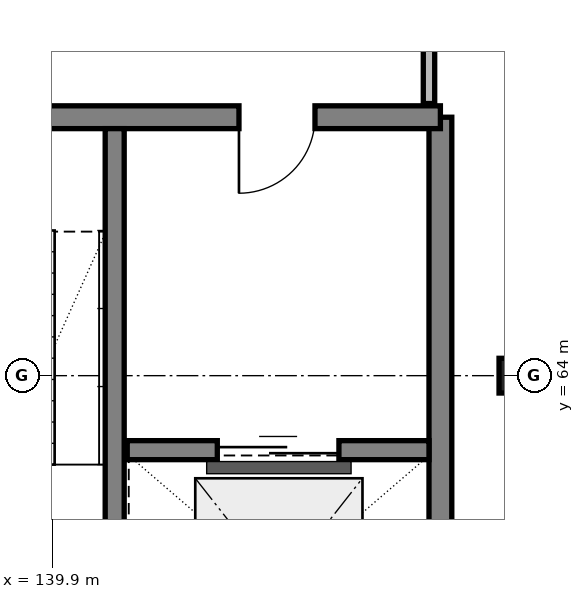
"""IFC4 building model, lengths in metres.
Left out: names, types, materials, properties, quantities, classifications, styles, units other than length and angle.
Written with IfcOpenShell. Run it as: python <this file> out.ifc"""

import sys

from ifc_helpers import new_model, si_unit, direction, frame, frame_2d, origin, origin_2d_with_axis, place, context, subcontext, project, spatial, rectangle, hollow_circle, extrude, element, fill, save


model = new_model("IFC4")
c1 = context("Model", 3, precision=1e-05, world=origin(), true_north=direction((0.0, 1.0)))
c2 = subcontext(c1, "Body", "Model", "MODEL_VIEW")
j1 = project(units=[si_unit("LENGTHUNIT", "METRE"), si_unit("PLANEANGLEUNIT", "RADIAN")], contexts=[c1])
p1 = place(None, origin())
s1 = spatial("IfcSite", under=j1, at=p1, CompositionType="ELEMENT")
p2 = place(p1, origin())
s2 = spatial("IfcBuilding", under=s1, at=p2, CompositionType="ELEMENT")
p3 = place(p2, origin())
s3 = spatial("IfcBuildingStorey", under=s2, at=p3, CompositionType="ELEMENT", Elevation=0.0)
p4 = place(p3, frame((146.0, 64.0, 0.0), z_axis=(0.0, 0.0, 1.0), x_axis=(1.0, 0.0, 0.0)))
e1 = element("IfcColumn", 1, at=p4, inside=s3, PredefinedType="COLUMN", context=c2, shape_type="SweptSolid", body=[
    extrude(hollow_circle(Radius=0.229, WallThickness=0.013, at=origin_2d_with_axis()), origin(), (0.0, 0.0, 1.0), 4.5),
])
p5 = place(p3, frame((145.0, 59.4, 0.0), z_axis=(0.0, 0.0, 1.0), x_axis=(0.0, 1.0, 0.0)))
e2 = element("IfcWall", 2, at=p5, inside=s3, PredefinedType="SHEAR", context=c2, shape_type="SweptSolid", body=[
    extrude(rectangle(XDim=8.0, YDim=0.3, at=frame_2d((4.0, 0.0), x_axis=(1.0, 0.0))), origin(), (0.0, 0.0, 1.0), 4.5),
])
p6 = place(p3, frame((145.0, 67.4, 0.0), z_axis=(0.0, 0.0, 1.0), x_axis=(-1.0, 0.0, 0.0)))
e3 = element("IfcWall", 3, at=p6, inside=s3, PredefinedType="SHEAR", context=c2, shape_type="SweptSolid", body=[
    extrude(rectangle(XDim=7.4, YDim=0.3, at=frame_2d((3.7, 0.0), x_axis=(1.0, 0.0))), origin(), (0.0, 0.0, 1.0), 4.5),
])
p7 = place(p6, frame((1.65, 0.0, 0.0)))
e4 = element("IfcOpeningElement", 4, at=p7, cuts=e3, PredefinedType="OPENING", context=c2, shape_type="SweptSolid", body=[
    extrude(rectangle(XDim=1.0, YDim=2.15, at=frame_2d((0.5, 1.075), x_axis=(1.0, 0.0))), frame((0.0, 0.16, 0.0), z_axis=(0.0, -1.0, 0.0), x_axis=(1.0, 0.0, 0.0)), (0.0, 0.0, 1.0), 0.32),
])
p8 = place(p6, frame((5.3, 0.0, 0.0)))
e5 = element("IfcOpeningElement", 5, at=p8, cuts=e3, PredefinedType="OPENING", context=c2, shape_type="SweptSolid", body=[
    extrude(rectangle(XDim=1.0, YDim=2.15, at=frame_2d((0.5, 1.075), x_axis=(1.0, 0.0))), frame((0.0, 0.16, 0.0), z_axis=(0.0, -1.0, 0.0), x_axis=(1.0, 0.0, 0.0)), (0.0, 0.0, 1.0), 0.32),
])
p9 = place(p3, frame((140.715, 59.55, 0.0), z_axis=(0.0, 0.0, 1.0), x_axis=(0.0, 1.0, 0.0)))
e6 = element("IfcWall", 6, at=p9, inside=s3, PredefinedType="SHEAR", context=c2, shape_type="SweptSolid", body=[
    extrude(rectangle(XDim=7.7, YDim=0.25, at=frame_2d((3.85, 0.0), x_axis=(1.0, 0.0))), origin(), (0.0, 0.0, 1.0), 4.5),
])
p10 = place(p3, frame((140.88, 63.02, 0.0), z_axis=(0.0, 0.0, 1.0), x_axis=(1.0, 0.0, 0.0)))
e7 = element("IfcWall", 7, at=p10, inside=s3, PredefinedType="SHEAR", context=c2, shape_type="SweptSolid", body=[
    extrude(rectangle(XDim=3.97, YDim=0.25, at=frame_2d((1.985, 0.0), x_axis=(1.0, 0.0))), origin(), (0.0, 0.0, 1.0), 4.24),
])
p11 = place(p10, frame((1.185, 0.0, 0.0)))
e8 = element("IfcOpeningElement", 8, at=p11, cuts=e7, PredefinedType="OPENING", context=c2, shape_type="SweptSolid", body=[
    extrude(rectangle(XDim=1.6, YDim=2.3, at=frame_2d((0.8, 1.15), x_axis=(1.0, 0.0))), frame((0.0, 0.135, 0.0), z_axis=(0.0, -1.0, 0.0), x_axis=(1.0, 0.0, 0.0)), (0.0, 0.0, 1.0), 0.27),
])
p12 = place(p3, frame((144.85, 67.58, 0.0), z_axis=(0.0, 0.0, 1.0), x_axis=(0.0, 1.0, 0.0)))
e9 = element("IfcWall", 9, at=p12, inside=s3, PredefinedType="PARTITIONING", context=c2, shape_type="SweptSolid", body=[
    extrude(rectangle(XDim=4.04, YDim=0.15, at=frame_2d((2.02, 0.0), x_axis=(1.0, 0.0))), origin(), (0.0, 0.0, 1.0), 4.2),
])
p13 = place(p12, frame((1.52, 0.0, 0.0)))
e10 = element("IfcOpeningElement", 10, at=p13, cuts=e9, PredefinedType="OPENING", context=c2, shape_type="SweptSolid", body=[
    extrude(rectangle(XDim=1.0, YDim=2.15, at=frame_2d((0.5, 1.075), x_axis=(1.0, 0.0))), frame((0.0, 0.085, 0.0), z_axis=(0.0, -1.0, 0.0), x_axis=(1.0, 0.0, 0.0)), (0.0, 0.0, 1.0), 0.17),
])
p14 = place(p7, origin())
e11 = element("IfcDoor", 11, at=p14, inside=s3, OperationType="SINGLE_SWING_RIGHT", PredefinedType="DOOR", context=c2, shape_type="SweptSolid", body=[
    extrude(rectangle(XDim=1.0, YDim=2.15, at=frame_2d((0.5, 1.075), x_axis=(1.0, 0.0))), frame((0.0, 0.025, 0.0), z_axis=(0.0, -1.0, 0.0), x_axis=(1.0, 0.0, 0.0)), (0.0, 0.0, 1.0), 0.05),
])
fill(e4, e11)
p15 = place(p11, origin())
e12 = element("IfcDoor", 12, at=p15, inside=s3, OperationType="SLIDING_TO_RIGHT", PredefinedType="DOOR", context=c2, shape_type="SweptSolid", body=[
    extrude(rectangle(XDim=1.6, YDim=2.3, at=frame_2d((0.8, 1.15), x_axis=(1.0, 0.0))), frame((0.0, 0.025, 0.0), z_axis=(0.0, -1.0, 0.0), x_axis=(1.0, 0.0, 0.0)), (0.0, 0.0, 1.0), 0.05),
])
fill(e8, e12)
save(model, sys.argv[1])
